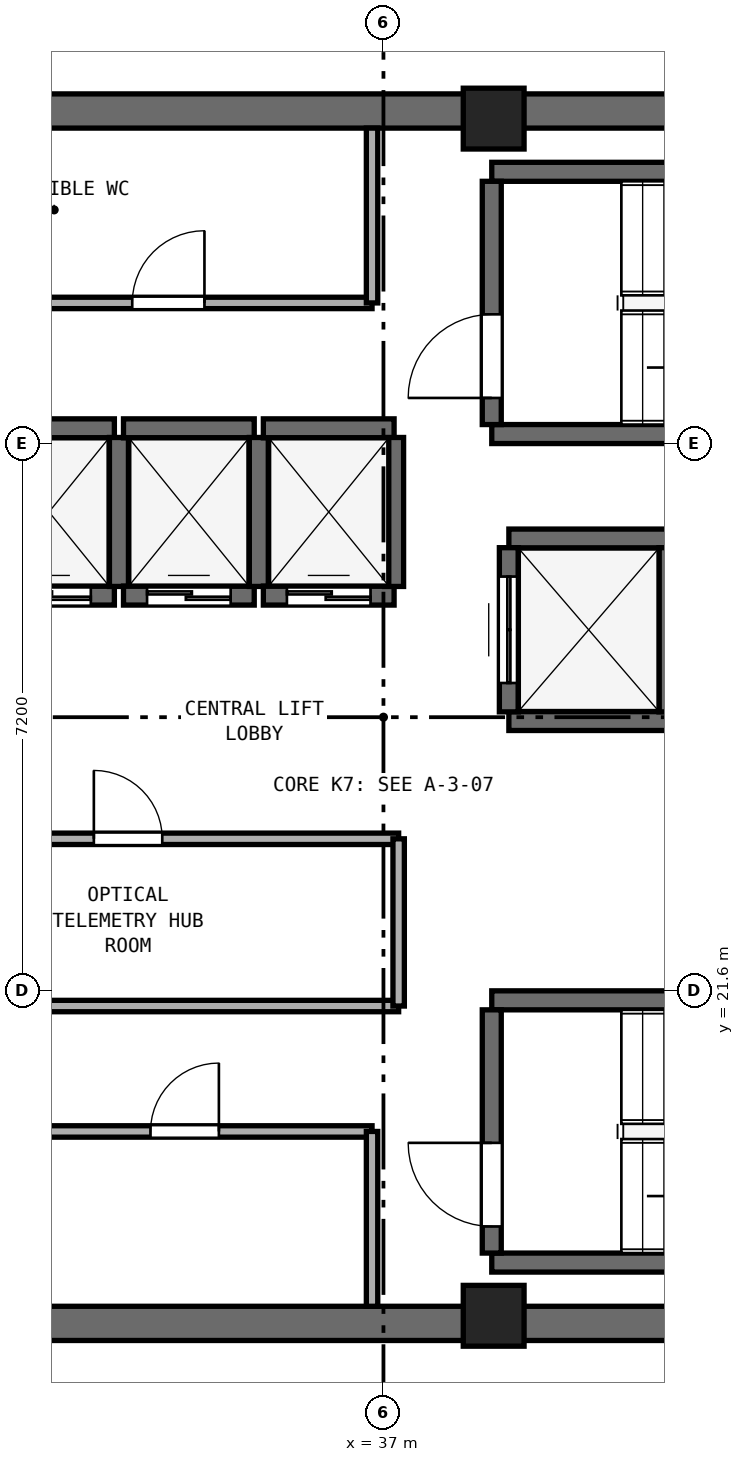
"""IFC4 building model, lengths in metres.
Left out: names, types, materials, properties, quantities, classifications, styles, units other than length and angle.
Written with IfcOpenShell. Run it as: python <this file> out.ifc"""

import sys

from ifc_helpers import new_model, si_unit, direction, frame, frame_2d, origin, origin_2d, place, context, subcontext, project, spatial, rectangle, extrude, element, fill, save


model = new_model("IFC4")
c1 = context("Model", 3, precision=1e-05, world=origin(), true_north=direction((0.0, 1.0)))
c2 = subcontext(c1, "Body", "Model", "MODEL_VIEW")
j1 = project(units=[si_unit("LENGTHUNIT", "METRE"), si_unit("PLANEANGLEUNIT", "RADIAN")], contexts=[c1])
p1 = place(None, origin())
s1 = spatial("IfcSite", under=j1, at=p1, CompositionType="ELEMENT")
p2 = place(p1, origin())
s2 = spatial("IfcBuilding", under=s1, at=p2, CompositionType="ELEMENT")
p3 = place(p2, frame((0.0, 0.0, 304.8)))
s3 = spatial("IfcBuildingStorey", under=s2, at=p3, CompositionType="ELEMENT", Elevation=304.8)
for number, where, z_axis, x_axis in (
    (1, (25.4, 17.225, 0.0), (0.0, 0.0, 1.0), (1.0, 0.0, 0.0)),
    (2, (25.4, 33.175, 0.0), (0.0, 0.0, 1.0), (1.0, 0.0, 0.0)),
):
    element("IfcWall", number, at=place(p3, frame(where, z_axis=z_axis, x_axis=x_axis)), inside=s3, PredefinedType="SHEAR", context=c2, shape_type="SweptSolid", body=[
        extrude(rectangle(XDim=23.2, YDim=0.45, at=frame_2d((11.6, 0.0))), origin(), (0.0, 0.0, 1.0), 3.4),
    ])
for number, where, z_axis, x_axis in (
    (3, (38.45, 17.325, 0.0), (0.0, 0.0, 1.0), (1.0, 0.0, 0.0)),
    (4, (38.45, 33.075, 0.0), (0.0, 0.0, 1.0), (1.0, 0.0, 0.0)),
):
    element("IfcColumn", number, at=place(p3, frame(where, z_axis=z_axis, x_axis=x_axis)), inside=s3, PredefinedType="PILASTER", context=c2, shape_type="SweptSolid", body=[
        extrude(rectangle(XDim=0.8, YDim=0.8, at=origin_2d()), origin(), (0.0, 0.0, 1.0), 3.8),
    ])
for number, where, z_axis, x_axis in (
    (5, (38.425, 28.925, 0.0), (0.0, 0.0, 1.0), (1.0, 0.0, 0.0)),
    (6, (38.425, 32.375, 0.0), (0.0, 0.0, 1.0), (1.0, 0.0, 0.0)),
):
    element("IfcWall", number, at=place(p3, frame(where, z_axis=z_axis, x_axis=x_axis)), inside=s3, PredefinedType="SHEAR", context=c2, shape_type="SweptSolid", body=[
        extrude(rectangle(XDim=7.3, YDim=0.25, at=frame_2d((3.65, 0.0))), origin(), (0.0, 0.0, 1.0), 3.4),
    ])
p4 = place(p3, frame((38.425, 29.05, 0.0), z_axis=(0.0, 0.0, 1.0), x_axis=(0.0, 1.0, 0.0)))
e7 = element("IfcWall", 7, at=p4, inside=s3, PredefinedType="SHEAR", context=c2, shape_type="SweptSolid", body=[
    extrude(rectangle(XDim=3.2, YDim=0.25, at=frame_2d((1.6, 0.0))), origin(), (0.0, 0.0, 1.0), 3.4),
])
p5 = place(p4, frame((0.35, 0.0, 0.0)))
e8 = element("IfcOpeningElement", 8, at=p5, cuts=e7, PredefinedType="OPENING", context=c2, shape_type="SweptSolid", body=[
    extrude(rectangle(XDim=1.1, YDim=2.15, at=frame_2d((0.55, 1.075))), frame((0.0, 0.135, 0.0), z_axis=(0.0, -1.0, 0.0), x_axis=(1.0, 0.0, 0.0)), (0.0, 0.0, 1.0), 0.27),
])
for number, where, z_axis, x_axis in (
    (9, (38.425, 18.025, 0.0), (0.0, 0.0, 1.0), (1.0, 0.0, 0.0)),
    (10, (38.425, 21.475, 0.0), (0.0, 0.0, 1.0), (1.0, 0.0, 0.0)),
):
    element("IfcWall", number, at=place(p3, frame(where, z_axis=z_axis, x_axis=x_axis)), inside=s3, PredefinedType="SHEAR", context=c2, shape_type="SweptSolid", body=[
        extrude(rectangle(XDim=7.3, YDim=0.25, at=frame_2d((3.65, 0.0))), origin(), (0.0, 0.0, 1.0), 3.4),
    ])
p6 = place(p3, frame((38.425, 18.15, 0.0), z_axis=(0.0, 0.0, 1.0), x_axis=(0.0, 1.0, 0.0)))
e11 = element("IfcWall", 11, at=p6, inside=s3, PredefinedType="SHEAR", context=c2, shape_type="SweptSolid", body=[
    extrude(rectangle(XDim=3.2, YDim=0.25, at=frame_2d((1.6, 0.0))), origin(), (0.0, 0.0, 1.0), 3.4),
])
p7 = place(p6, frame((0.35, 0.0, 0.0)))
e12 = element("IfcOpeningElement", 12, at=p7, cuts=e11, PredefinedType="OPENING", context=c2, shape_type="SweptSolid", body=[
    extrude(rectangle(XDim=1.1, YDim=2.15, at=frame_2d((0.55, 1.075))), frame((0.0, 0.135, 0.0), z_axis=(0.0, -1.0, 0.0), x_axis=(1.0, 0.0, 0.0)), (0.0, 0.0, 1.0), 0.27),
])
p8 = place(p3, frame((31.74, 26.8, 0.0), z_axis=(0.0, 0.0, 1.0), x_axis=(1.0, 0.0, 0.0)))
e13 = element("IfcWall", 13, at=p8, inside=s3, PredefinedType="SHEAR", context=c2, shape_type="SweptSolid", body=[
    extrude(rectangle(XDim=1.72, YDim=0.25, at=frame_2d((0.86, 0.0))), origin(), (0.0, 0.0, 1.0), 3.4),
])
p9 = place(p8, frame((0.31, 0.0, 0.0)))
e14 = element("IfcOpeningElement", 14, at=p9, cuts=e13, PredefinedType="OPENING", context=c2, shape_type="SweptSolid", body=[
    extrude(rectangle(XDim=1.1, YDim=2.15, at=frame_2d((0.55, 1.075))), frame((0.0, 0.135, 0.0), z_axis=(0.0, -1.0, 0.0), x_axis=(1.0, 0.0, 0.0)), (0.0, 0.0, 1.0), 0.27),
])
p10 = place(p3, frame((31.74, 29.0, 0.0), z_axis=(0.0, 0.0, 1.0), x_axis=(1.0, 0.0, 0.0)))
e15 = element("IfcWall", 15, at=p10, inside=s3, PredefinedType="SHEAR", context=c2, shape_type="SweptSolid", body=[
    extrude(rectangle(XDim=1.72, YDim=0.25, at=frame_2d((0.86, 0.0))), origin(), (0.0, 0.0, 1.0), 3.4),
])
p11 = place(p3, frame((33.52, 26.92, 0.0), z_axis=(0.0, 0.0, 1.0), x_axis=(0.0, 1.0, 0.0)))
e16 = element("IfcWall", 16, at=p11, inside=s3, PredefinedType="SHEAR", context=c2, shape_type="SweptSolid", body=[
    extrude(rectangle(XDim=1.96, YDim=0.25, at=frame_2d((0.98, 0.0))), origin(), (0.0, 0.0, 1.0), 3.4),
])
p12 = place(p3, frame((33.58, 26.8, 0.0), z_axis=(0.0, 0.0, 1.0), x_axis=(1.0, 0.0, 0.0)))
e17 = element("IfcWall", 17, at=p12, inside=s3, PredefinedType="SHEAR", context=c2, shape_type="SweptSolid", body=[
    extrude(rectangle(XDim=1.72, YDim=0.25, at=frame_2d((0.86, 0.0))), origin(), (0.0, 0.0, 1.0), 3.4),
])
p13 = place(p12, frame((0.31, 0.0, 0.0)))
e18 = element("IfcOpeningElement", 18, at=p13, cuts=e17, PredefinedType="OPENING", context=c2, shape_type="SweptSolid", body=[
    extrude(rectangle(XDim=1.1, YDim=2.15, at=frame_2d((0.55, 1.075))), frame((0.0, 0.135, 0.0), z_axis=(0.0, -1.0, 0.0), x_axis=(1.0, 0.0, 0.0)), (0.0, 0.0, 1.0), 0.27),
])
p14 = place(p3, frame((33.58, 29.0, 0.0), z_axis=(0.0, 0.0, 1.0), x_axis=(1.0, 0.0, 0.0)))
e19 = element("IfcWall", 19, at=p14, inside=s3, PredefinedType="SHEAR", context=c2, shape_type="SweptSolid", body=[
    extrude(rectangle(XDim=1.72, YDim=0.25, at=frame_2d((0.86, 0.0))), origin(), (0.0, 0.0, 1.0), 3.4),
])
p15 = place(p3, frame((35.36, 26.92, 0.0), z_axis=(0.0, 0.0, 1.0), x_axis=(0.0, 1.0, 0.0)))
e20 = element("IfcWall", 20, at=p15, inside=s3, PredefinedType="SHEAR", context=c2, shape_type="SweptSolid", body=[
    extrude(rectangle(XDim=1.96, YDim=0.25, at=frame_2d((0.98, 0.0))), origin(), (0.0, 0.0, 1.0), 3.4),
])
p16 = place(p3, frame((35.42, 26.8, 0.0), z_axis=(0.0, 0.0, 1.0), x_axis=(1.0, 0.0, 0.0)))
e21 = element("IfcWall", 21, at=p16, inside=s3, PredefinedType="SHEAR", context=c2, shape_type="SweptSolid", body=[
    extrude(rectangle(XDim=1.72, YDim=0.25, at=frame_2d((0.86, 0.0))), origin(), (0.0, 0.0, 1.0), 3.4),
])
p17 = place(p16, frame((0.31, 0.0, 0.0)))
e22 = element("IfcOpeningElement", 22, at=p17, cuts=e21, PredefinedType="OPENING", context=c2, shape_type="SweptSolid", body=[
    extrude(rectangle(XDim=1.1, YDim=2.15, at=frame_2d((0.55, 1.075))), frame((0.0, 0.135, 0.0), z_axis=(0.0, -1.0, 0.0), x_axis=(1.0, 0.0, 0.0)), (0.0, 0.0, 1.0), 0.27),
])
p18 = place(p3, frame((35.42, 29.0, 0.0), z_axis=(0.0, 0.0, 1.0), x_axis=(1.0, 0.0, 0.0)))
e23 = element("IfcWall", 23, at=p18, inside=s3, PredefinedType="SHEAR", context=c2, shape_type="SweptSolid", body=[
    extrude(rectangle(XDim=1.72, YDim=0.25, at=frame_2d((0.86, 0.0))), origin(), (0.0, 0.0, 1.0), 3.4),
])
p19 = place(p3, frame((37.14, 26.92, 0.0), z_axis=(0.0, 0.0, 1.0), x_axis=(0.0, 1.0, 0.0)))
e24 = element("IfcWall", 24, at=p19, inside=s3, PredefinedType="SHEAR", context=c2, shape_type="SweptSolid", body=[
    extrude(rectangle(XDim=1.96, YDim=0.25, at=frame_2d((0.98, 0.0))), origin(), (0.0, 0.0, 1.0), 3.4),
])
for number, where, z_axis, x_axis in (
    (25, (38.65, 25.15, 0.0), (0.0, 0.0, 1.0), (1.0, 0.0, 0.0)),
    (26, (38.65, 27.55, 0.0), (0.0, 0.0, 1.0), (1.0, 0.0, 0.0)),
):
    element("IfcWall", number, at=place(p3, frame(where, z_axis=z_axis, x_axis=x_axis)), inside=s3, PredefinedType="SHEAR", context=c2, shape_type="SweptSolid", body=[
        extrude(rectangle(XDim=2.1, YDim=0.25, at=frame_2d((1.05, 0.0))), origin(), (0.0, 0.0, 1.0), 3.4),
    ])
p20 = place(p3, frame((38.65, 25.27, 0.0), z_axis=(0.0, 0.0, 1.0), x_axis=(0.0, 1.0, 0.0)))
e27 = element("IfcWall", 27, at=p20, inside=s3, PredefinedType="SHEAR", context=c2, shape_type="SweptSolid", body=[
    extrude(rectangle(XDim=2.16, YDim=0.25, at=frame_2d((1.08, 0.0))), origin(), (0.0, 0.0, 1.0), 3.4),
])
p21 = place(p20, frame((0.38, 0.0, 0.0)))
e28 = element("IfcOpeningElement", 28, at=p21, cuts=e27, PredefinedType="OPENING", context=c2, shape_type="SweptSolid", body=[
    extrude(rectangle(XDim=1.4, YDim=2.2, at=frame_2d((0.7, 1.1))), frame((0.0, 0.135, 0.0), z_axis=(0.0, -1.0, 0.0), x_axis=(1.0, 0.0, 0.0)), (0.0, 0.0, 1.0), 0.27),
])
p22 = place(p3, frame((40.75, 25.27, 0.0), z_axis=(0.0, 0.0, 1.0), x_axis=(0.0, 1.0, 0.0)))
e29 = element("IfcWall", 29, at=p22, inside=s3, PredefinedType="SHEAR", context=c2, shape_type="SweptSolid", body=[
    extrude(rectangle(XDim=2.16, YDim=0.25, at=frame_2d((1.08, 0.0))), origin(), (0.0, 0.0, 1.0), 3.4),
])
p23 = place(p3, frame((31.49, 30.65, 0.0), z_axis=(0.0, 0.0, 1.0), x_axis=(1.0, 0.0, 0.0)))
e30 = element("IfcWall", 30, at=p23, inside=s3, PredefinedType="PARTITIONING", context=c2, shape_type="SweptSolid", body=[
    extrude(rectangle(XDim=5.36, YDim=0.15, at=frame_2d((2.68, 0.0))), origin(), (0.0, 0.0, 1.0), 3.4),
])
p24 = place(p23, frame((2.205, 0.0, 0.0)))
e31 = element("IfcOpeningElement", 31, at=p24, cuts=e30, PredefinedType="OPENING", context=c2, shape_type="SweptSolid", body=[
    extrude(rectangle(XDim=0.95, YDim=2.1, at=frame_2d((0.475, 1.05))), frame((0.0, 0.085, 0.0), z_axis=(0.0, -1.0, 0.0), x_axis=(1.0, 0.0, 0.0)), (0.0, 0.0, 1.0), 0.17),
])
p25 = place(p3, frame((36.85, 30.65, 0.0), z_axis=(0.0, 0.0, 1.0), x_axis=(0.0, 1.0, 0.0)))
e32 = element("IfcWall", 32, at=p25, inside=s3, PredefinedType="PARTITIONING", context=c2, shape_type="SweptSolid", body=[
    extrude(rectangle(XDim=2.3, YDim=0.15, at=frame_2d((1.15, 0.0))), origin(), (0.0, 0.0, 1.0), 3.4),
])
p26 = place(p3, frame((31.92, 19.75, 0.0), z_axis=(0.0, 0.0, 1.0), x_axis=(1.0, 0.0, 0.0)))
e33 = element("IfcWall", 33, at=p26, inside=s3, PredefinedType="PARTITIONING", context=c2, shape_type="SweptSolid", body=[
    extrude(rectangle(XDim=4.93, YDim=0.15, at=frame_2d((2.465, 0.0))), origin(), (0.0, 0.0, 1.0), 3.4),
])
p27 = place(p26, frame((2.015, 0.0, 0.0)))
e34 = element("IfcOpeningElement", 34, at=p27, cuts=e33, PredefinedType="OPENING", context=c2, shape_type="SweptSolid", body=[
    extrude(rectangle(XDim=0.9, YDim=2.1, at=frame_2d((0.45, 1.05))), frame((0.0, 0.085, 0.0), z_axis=(0.0, -1.0, 0.0), x_axis=(1.0, 0.0, 0.0)), (0.0, 0.0, 1.0), 0.17),
])
p28 = place(p3, frame((36.85, 17.45, 0.0), z_axis=(0.0, 0.0, 1.0), x_axis=(0.0, 1.0, 0.0)))
e35 = element("IfcWall", 35, at=p28, inside=s3, PredefinedType="PARTITIONING", context=c2, shape_type="SweptSolid", body=[
    extrude(rectangle(XDim=2.3, YDim=0.15, at=frame_2d((1.15, 0.0))), origin(), (0.0, 0.0, 1.0), 3.4),
])
p29 = place(p3, frame((30.08, 21.4, 0.0), z_axis=(0.0, 0.0, 1.0), x_axis=(1.0, 0.0, 0.0)))
e36 = element("IfcWall", 36, at=p29, inside=s3, PredefinedType="PARTITIONING", context=c2, shape_type="SweptSolid", body=[
    extrude(rectangle(XDim=7.12, YDim=0.15, at=frame_2d((3.56, 0.0))), origin(), (0.0, 0.0, 1.0), 3.4),
])
p30 = place(p3, frame((30.08, 23.6, 0.0), z_axis=(0.0, 0.0, 1.0), x_axis=(1.0, 0.0, 0.0)))
e37 = element("IfcWall", 37, at=p30, inside=s3, PredefinedType="PARTITIONING", context=c2, shape_type="SweptSolid", body=[
    extrude(rectangle(XDim=7.12, YDim=0.15, at=frame_2d((3.56, 0.0))), origin(), (0.0, 0.0, 1.0), 3.4),
])
p31 = place(p30, frame((3.11, 0.0, 0.0)))
e38 = element("IfcOpeningElement", 38, at=p31, cuts=e37, PredefinedType="OPENING", context=c2, shape_type="SweptSolid", body=[
    extrude(rectangle(XDim=0.9, YDim=2.1, at=frame_2d((0.45, 1.05))), frame((0.0, 0.085, 0.0), z_axis=(0.0, -1.0, 0.0), x_axis=(1.0, 0.0, 0.0)), (0.0, 0.0, 1.0), 0.17),
])
p32 = place(p3, frame((37.2, 21.4, 0.0), z_axis=(0.0, 0.0, 1.0), x_axis=(0.0, 1.0, 0.0)))
e39 = element("IfcWall", 39, at=p32, inside=s3, PredefinedType="PARTITIONING", context=c2, shape_type="SweptSolid", body=[
    extrude(rectangle(XDim=2.2, YDim=0.15, at=frame_2d((1.1, 0.0))), origin(), (0.0, 0.0, 1.0), 3.4),
])
p33 = place(p5, origin())
e40 = element("IfcDoor", 40, at=p33, inside=s3, OperationType="SINGLE_SWING_LEFT", PredefinedType="DOOR", context=c2, shape_type="SweptSolid", body=[
    extrude(rectangle(XDim=1.1, YDim=2.15, at=frame_2d((0.55, 1.075))), frame((0.0, 0.025, 0.0), z_axis=(0.0, -1.0, 0.0), x_axis=(1.0, 0.0, 0.0)), (0.0, 0.0, 1.0), 0.05),
])
fill(e8, e40)
p34 = place(p7, origin())
e41 = element("IfcDoor", 41, at=p34, inside=s3, OperationType="SINGLE_SWING_RIGHT", PredefinedType="DOOR", context=c2, shape_type="SweptSolid", body=[
    extrude(rectangle(XDim=1.1, YDim=2.15, at=frame_2d((0.55, 1.075))), frame((0.0, 0.025, 0.0), z_axis=(0.0, -1.0, 0.0), x_axis=(1.0, 0.0, 0.0)), (0.0, 0.0, 1.0), 0.05),
])
fill(e12, e41)
p35 = place(p9, origin())
e42 = element("IfcDoor", 42, at=p35, inside=s3, OperationType="DOUBLE_DOOR_SLIDING", PredefinedType="DOOR", context=c2, shape_type="SweptSolid", body=[
    extrude(rectangle(XDim=1.1, YDim=2.15, at=frame_2d((0.55, 1.075))), frame((0.0, 0.025, 0.0), z_axis=(0.0, -1.0, 0.0), x_axis=(1.0, 0.0, 0.0)), (0.0, 0.0, 1.0), 0.05),
])
fill(e14, e42)
p36 = place(p13, origin())
e43 = element("IfcDoor", 43, at=p36, inside=s3, OperationType="DOUBLE_DOOR_SLIDING", PredefinedType="DOOR", context=c2, shape_type="SweptSolid", body=[
    extrude(rectangle(XDim=1.1, YDim=2.15, at=frame_2d((0.55, 1.075))), frame((0.0, 0.025, 0.0), z_axis=(0.0, -1.0, 0.0), x_axis=(1.0, 0.0, 0.0)), (0.0, 0.0, 1.0), 0.05),
])
fill(e18, e43)
p37 = place(p17, origin())
e44 = element("IfcDoor", 44, at=p37, inside=s3, OperationType="DOUBLE_DOOR_SLIDING", PredefinedType="DOOR", context=c2, shape_type="SweptSolid", body=[
    extrude(rectangle(XDim=1.1, YDim=2.15, at=frame_2d((0.55, 1.075))), frame((0.0, 0.025, 0.0), z_axis=(0.0, -1.0, 0.0), x_axis=(1.0, 0.0, 0.0)), (0.0, 0.0, 1.0), 0.05),
])
fill(e22, e44)
p38 = place(p21, origin())
e45 = element("IfcDoor", 45, at=p38, inside=s3, OperationType="DOUBLE_DOOR_SLIDING", PredefinedType="DOOR", context=c2, shape_type="SweptSolid", body=[
    extrude(rectangle(XDim=1.4, YDim=2.2, at=frame_2d((0.7, 1.1))), frame((0.0, 0.025, 0.0), z_axis=(0.0, -1.0, 0.0), x_axis=(1.0, 0.0, 0.0)), (0.0, 0.0, 1.0), 0.05),
])
fill(e28, e45)
p39 = place(p24, origin())
e46 = element("IfcDoor", 46, at=p39, inside=s3, OperationType="SINGLE_SWING_RIGHT", PredefinedType="DOOR", context=c2, shape_type="SweptSolid", body=[
    extrude(rectangle(XDim=0.95, YDim=2.1, at=frame_2d((0.475, 1.05))), frame((0.0, 0.025, 0.0), z_axis=(0.0, -1.0, 0.0), x_axis=(1.0, 0.0, 0.0)), (0.0, 0.0, 1.0), 0.05),
])
fill(e31, e46)
p40 = place(p27, origin())
e47 = element("IfcDoor", 47, at=p40, inside=s3, OperationType="SINGLE_SWING_RIGHT", PredefinedType="DOOR", context=c2, shape_type="SweptSolid", body=[
    extrude(rectangle(XDim=0.9, YDim=2.1, at=frame_2d((0.45, 1.05))), frame((0.0, 0.025, 0.0), z_axis=(0.0, -1.0, 0.0), x_axis=(1.0, 0.0, 0.0)), (0.0, 0.0, 1.0), 0.05),
])
fill(e34, e47)
p41 = place(p31, origin())
e48 = element("IfcDoor", 48, at=p41, inside=s3, OperationType="SINGLE_SWING_LEFT", PredefinedType="DOOR", context=c2, shape_type="SweptSolid", body=[
    extrude(rectangle(XDim=0.9, YDim=2.1, at=frame_2d((0.45, 1.05))), frame((0.0, 0.025, 0.0), z_axis=(0.0, -1.0, 0.0), x_axis=(1.0, 0.0, 0.0)), (0.0, 0.0, 1.0), 0.05),
])
fill(e38, e48)
save(model, sys.argv[1])
